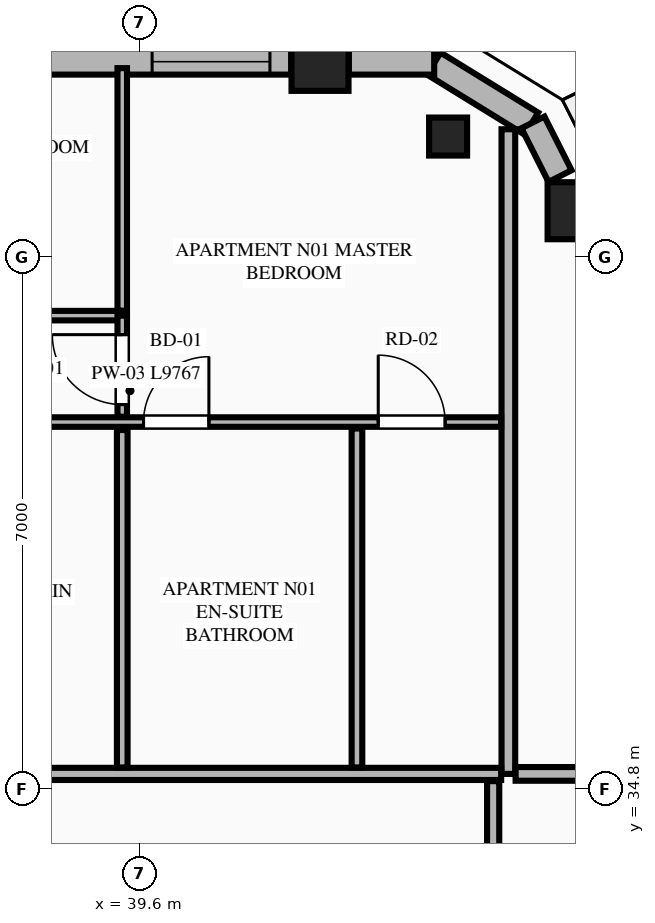
"""IFC4 building model, lengths in metres.
Left out: names, types, materials, properties, quantities, classifications, styles, units other than length and angle.
Written with IfcOpenShell. Run it as: python <this file> out.ifc"""

import sys

from ifc_helpers import new_model, si_unit, direction, frame, frame_2d, origin, origin_2d, place, context, subcontext, project, spatial, rectangle, extrude, element, fill, save


model = new_model("IFC4")
c1 = context("Model", 3, precision=1e-05, world=origin(), true_north=direction((0.0, 1.0)))
c2 = subcontext(c1, "Body", "Model", "MODEL_VIEW")
j1 = project(units=[si_unit("LENGTHUNIT", "METRE"), si_unit("PLANEANGLEUNIT", "RADIAN")], contexts=[c1])
p1 = place(None, origin())
s1 = spatial("IfcSite", under=j1, at=p1, CompositionType="ELEMENT")
p2 = place(p1, origin())
s2 = spatial("IfcBuilding", under=s1, at=p2, CompositionType="ELEMENT")
p3 = place(p2, frame((0.0, 0.0, 245.25)))
s3 = spatial("IfcBuildingStorey", under=s2, at=p3, CompositionType="ELEMENT", Elevation=245.25)
for number, where, z_axis, x_axis in (
    (1, (45.341, 42.409, 0.0), (0.0, 0.0, 1.0), (1.0, 0.0, 0.0)),
    (2, (41.972, 44.361, 0.0), (0.0, 0.0, 1.0), (1.0, 0.0, 0.0)),
):
    element("IfcColumn", number, at=place(p3, frame(where, z_axis=z_axis, x_axis=x_axis)), inside=s3, PredefinedType="COLUMN", context=c2, shape_type="SweptSolid", body=[
        extrude(rectangle(XDim=0.75, YDim=0.75, at=origin_2d()), origin(), (0.0, 0.0, 1.0), 3.65),
    ])
p4 = place(p3, frame((43.657, 43.385, 0.0), z_axis=(0.0, 0.0, 1.0), x_axis=(-0.865256437757, 0.501329529272, 0.0)))
e3 = element("IfcColumn", 3, at=p4, inside=s3, PredefinedType="PILASTER", context=c2, shape_type="SweptSolid", body=[
    extrude(rectangle(XDim=0.5, YDim=0.35, at=origin_2d()), origin(), (0.0, 0.0, 1.0), 3.65),
])
p5 = place(p3, frame((44.753, 43.555, 0.0), z_axis=(0.0, 0.0, 1.0), x_axis=(-0.851680557619, 0.52406128246, 0.0)))
e4 = element("IfcWall", 4, at=p5, inside=s3, PredefinedType="STANDARD", context=c2, shape_type="SweptSolid", body=[
    extrude(rectangle(XDim=1.508, YDim=0.34, at=frame_2d((0.754, 0.0))), origin(), (0.0, 0.0, 1.0), 3.45),
])
p6 = place(p3, frame((45.13, 42.865, 0.0), z_axis=(0.0, 0.0, 1.0), x_axis=(-0.451159191899, 0.892443490404, 0.0)))
e5 = element("IfcWall", 5, at=p6, inside=s3, PredefinedType="STANDARD", context=c2, shape_type="SweptSolid", body=[
    extrude(rectangle(XDim=0.791, YDim=0.34, at=frame_2d((0.396, 0.0))), origin(), (0.0, 0.0, 1.0), 3.45),
])
p7 = place(p3, frame((43.474, 44.37, 0.0), z_axis=(0.0, 0.0, 1.0), x_axis=(-1.0, 0.0, 0.0)))
e6 = element("IfcWall", 6, at=p7, inside=s3, PredefinedType="STANDARD", context=c2, shape_type="SweptSolid", body=[
    extrude(rectangle(XDim=1.123, YDim=0.34, at=frame_2d((0.562, 0.0))), origin(), (0.0, 0.0, 1.0), 3.45),
])
p8 = place(p3, frame((41.593, 44.37, 0.0), z_axis=(0.0, 0.0, 1.0), x_axis=(-1.0, 0.0, 0.0)))
e7 = element("IfcWall", 7, at=p8, inside=s3, PredefinedType="STANDARD", context=c2, shape_type="SweptSolid", body=[
    extrude(rectangle(XDim=5.56, YDim=0.34, at=frame_2d((2.78, 0.0))), origin(), (0.0, 0.0, 1.0), 2.983),
])
p9 = place(p8, frame((0.28, 0.0, 0.75)))
e8 = element("IfcOpeningElement", 8, at=p9, cuts=e7, PredefinedType="OPENING", context=c2, shape_type="SweptSolid", body=[
    extrude(rectangle(XDim=1.55, YDim=2.05, at=frame_2d((0.775, 1.025))), frame((0.0, 0.18, 0.0), z_axis=(0.0, -1.0, 0.0), x_axis=(1.0, 0.0, 0.0)), (0.0, 0.0, 1.0), 0.36),
])
p10 = place(p8, frame((3.398, 0.0, 0.75)))
e9 = element("IfcOpeningElement", 9, at=p10, cuts=e7, PredefinedType="OPENING", context=c2, shape_type="SweptSolid", body=[
    extrude(rectangle(XDim=1.1, YDim=2.0, at=frame_2d((0.55, 1.0))), frame((0.0, 0.18, 0.0), z_axis=(0.0, -1.0, 0.0), x_axis=(1.0, 0.0, 0.0)), (0.0, 0.0, 1.0), 0.36),
])
p11 = place(p3, frame((44.45, 35.0, 0.0), z_axis=(0.0, 0.0, 1.0), x_axis=(0.0, 1.0, 0.0)))
e10 = element("IfcWall", 10, at=p11, inside=s3, PredefinedType="PARTITIONING", context=c2, shape_type="SweptSolid", body=[
    extrude(rectangle(XDim=8.481, YDim=0.18, at=frame_2d((4.24, 0.0))), origin(), (0.0, 0.0, 1.0), 3.45),
])
p12 = place(p3, frame((20.445, 35.0, 0.0), z_axis=(0.0, 0.0, 1.0), x_axis=(1.0, 0.0, 0.0)))
e11 = element("IfcWall", 11, at=p12, inside=s3, PredefinedType="PARTITIONING", context=c2, shape_type="SweptSolid", body=[
    extrude(rectangle(XDim=23.91, YDim=0.16, at=frame_2d((11.955, 0.0))), origin(), (0.0, 0.0, 1.0), 3.45),
])
p13 = place(p12, frame((0.405, 0.0, 0.0)))
e12 = element("IfcOpeningElement", 12, at=p13, cuts=e11, PredefinedType="OPENING", context=c2, shape_type="SweptSolid", body=[
    extrude(rectangle(XDim=1.35, YDim=2.35, at=frame_2d((0.675, 1.175))), frame((0.0, 0.09, 0.0), z_axis=(0.0, -1.0, 0.0), x_axis=(1.0, 0.0, 0.0)), (0.0, 0.0, 1.0), 0.18),
])
p14 = place(p3, frame((34.588, 39.629, 0.0), z_axis=(0.0, 0.0, 1.0), x_axis=(1.0, 0.0, 0.0)))
e13 = element("IfcWall", 13, at=p14, inside=s3, PredefinedType="PARTITIONING", context=c2, shape_type="SweptSolid", body=[
    extrude(rectangle(XDim=9.767, YDim=0.125, at=frame_2d((4.884, 0.0))), origin(), (0.0, 0.0, 1.0), 3.45),
])
p15 = place(p14, frame((5.062, 0.0, 0.0)))
e14 = element("IfcOpeningElement", 14, at=p15, cuts=e13, PredefinedType="OPENING", context=c2, shape_type="SweptSolid", body=[
    extrude(rectangle(XDim=0.86, YDim=2.1, at=frame_2d((0.43, 1.05))), frame((0.0, 0.073, 0.0), z_axis=(0.0, -1.0, 0.0), x_axis=(1.0, 0.0, 0.0)), (0.0, 0.0, 1.0), 0.145),
])
p16 = place(p14, frame((8.15, 0.0, 0.0)))
e15 = element("IfcOpeningElement", 15, at=p16, cuts=e13, PredefinedType="OPENING", context=c2, shape_type="SweptSolid", body=[
    extrude(rectangle(XDim=0.88, YDim=2.15, at=frame_2d((0.44, 1.075))), frame((0.0, 0.073, 0.0), z_axis=(0.0, -1.0, 0.0), x_axis=(1.0, 0.0, 0.0)), (0.0, 0.0, 1.0), 0.145),
])
p17 = place(p14, frame((0.3, 0.0, 0.0)))
e16 = element("IfcOpeningElement", 16, at=p17, cuts=e13, PredefinedType="OPENING", context=c2, shape_type="SweptSolid", body=[
    extrude(rectangle(XDim=0.88, YDim=2.15, at=frame_2d((0.44, 1.075))), frame((0.0, 0.073, 0.0), z_axis=(0.0, -1.0, 0.0), x_axis=(1.0, 0.0, 0.0)), (0.0, 0.0, 1.0), 0.145),
])
p18 = place(p3, frame((29.508, 41.029, 0.0), z_axis=(0.0, 0.0, 1.0), x_axis=(1.0, 0.0, 0.0)))
e17 = element("IfcWall", 17, at=p18, inside=s3, PredefinedType="PARTITIONING", context=c2, shape_type="SweptSolid", body=[
    extrude(rectangle(XDim=9.862, YDim=0.125, at=frame_2d((4.931, 0.0))), origin(), (0.0, 0.0, 1.0), 3.45),
])
p19 = place(p18, frame((0.35, 0.0, 0.0)))
e18 = element("IfcOpeningElement", 18, at=p19, cuts=e17, PredefinedType="OPENING", context=c2, shape_type="SweptSolid", body=[
    extrude(rectangle(XDim=0.92, YDim=2.15, at=frame_2d((0.46, 1.075))), frame((0.0, 0.073, 0.0), z_axis=(0.0, -1.0, 0.0), x_axis=(1.0, 0.0, 0.0)), (0.0, 0.0, 1.0), 0.145),
])
p20 = place(p18, frame((5.43, 0.0, 0.0)))
e19 = element("IfcOpeningElement", 19, at=p20, cuts=e17, PredefinedType="OPENING", context=c2, shape_type="SweptSolid", body=[
    extrude(rectangle(XDim=0.92, YDim=2.15, at=frame_2d((0.46, 1.075))), frame((0.0, 0.073, 0.0), z_axis=(0.0, -1.0, 0.0), x_axis=(1.0, 0.0, 0.0)), (0.0, 0.0, 1.0), 0.145),
])
p21 = place(p3, frame((39.37, 39.699, 0.0), z_axis=(0.0, 0.0, 1.0), x_axis=(0.0, 1.0, 0.0)))
e20 = element("IfcWall", 20, at=p21, inside=s3, PredefinedType="PARTITIONING", context=c2, shape_type="SweptSolid", body=[
    extrude(rectangle(XDim=1.33, YDim=0.125, at=frame_2d((0.665, 0.0))), origin(), (0.0, 0.0, 1.0), 3.45),
])
p22 = place(p21, frame((0.16, 0.0, 0.0)))
e21 = element("IfcOpeningElement", 21, at=p22, cuts=e20, PredefinedType="OPENING", context=c2, shape_type="SweptSolid", body=[
    extrude(rectangle(XDim=0.92, YDim=2.15, at=frame_2d((0.46, 1.075))), frame((0.0, 0.073, 0.0), z_axis=(0.0, -1.0, 0.0), x_axis=(1.0, 0.0, 0.0)), (0.0, 0.0, 1.0), 0.145),
])
p23 = place(p3, frame((39.37, 41.094, 0.0), z_axis=(0.0, 0.0, 1.0), x_axis=(0.0, 1.0, 0.0)))
e22 = element("IfcWall", 22, at=p23, inside=s3, PredefinedType="PARTITIONING", context=c2, shape_type="SweptSolid", body=[
    extrude(rectangle(XDim=3.191, YDim=0.125, at=frame_2d((1.595, 0.0))), origin(), (0.0, 0.0, 1.0), 3.45),
])
p24 = place(p3, frame((39.37, 35.085, 0.0), z_axis=(0.0, 0.0, 1.0), x_axis=(0.0, 1.0, 0.0)))
e23 = element("IfcWall", 23, at=p24, inside=s3, PredefinedType="PLUMBINGWALL", context=c2, shape_type="SweptSolid", body=[
    extrude(rectangle(XDim=4.439, YDim=0.14, at=frame_2d((2.219, 0.0))), origin(), (0.0, 0.0, 1.0), 3.45),
])
p25 = place(p3, frame((42.458, 35.085, 0.0), z_axis=(0.0, 0.0, 1.0), x_axis=(0.0, 1.0, 0.0)))
e24 = element("IfcWall", 24, at=p25, inside=s3, PredefinedType="PLUMBINGWALL", context=c2, shape_type="SweptSolid", body=[
    extrude(rectangle(XDim=4.459, YDim=0.14, at=frame_2d((2.229, 0.0))), origin(), (0.0, 0.0, 1.0), 3.45),
])
p26 = place(p3, frame((44.545, 35.0, 0.0), z_axis=(0.0, 0.0, 1.0), x_axis=(1.0, 0.0, 0.0)))
e25 = element("IfcWall", 25, at=p26, inside=s3, PredefinedType="PARTITIONING", context=c2, shape_type="SweptSolid", body=[
    extrude(rectangle(XDim=4.322, YDim=0.18, at=frame_2d((2.161, 0.0))), origin(), (0.0, 0.0, 1.0), 3.45),
])
p27 = place(p3, frame((44.25, 16.495, 0.0), z_axis=(0.0, 0.0, 1.0), x_axis=(0.0, 1.0, 0.0)))
e26 = element("IfcWall", 26, at=p27, inside=s3, PredefinedType="PARTITIONING", context=c2, shape_type="SweptSolid", body=[
    extrude(rectangle(XDim=18.41, YDim=0.16, at=frame_2d((9.205, 0.0))), origin(), (0.0, 0.0, 1.0), 3.137),
])
p28 = place(p27, frame((0.45, 0.0, 0.0)))
e27 = element("IfcOpeningElement", 27, at=p28, cuts=e26, PredefinedType="OPENING", context=c2, shape_type="SweptSolid", body=[
    extrude(rectangle(XDim=1.02, YDim=2.25, at=frame_2d((0.51, 1.125))), frame((0.0, 0.09, 0.0), z_axis=(0.0, -1.0, 0.0), x_axis=(1.0, 0.0, 0.0)), (0.0, 0.0, 1.0), 0.18),
])
p29 = place(p9, origin())
e28 = element("IfcWindow", 28, at=p29, inside=s3, PartitioningType="SINGLE_PANEL", PredefinedType="WINDOW", context=c2, shape_type="SweptSolid", body=[
    extrude(rectangle(XDim=1.55, YDim=2.05, at=frame_2d((0.775, 1.025))), frame((0.0, 0.03, 0.0), z_axis=(0.0, -1.0, 0.0), x_axis=(1.0, 0.0, 0.0)), (0.0, 0.0, 1.0), 0.06),
])
fill(e8, e28)
p30 = place(p15, origin())
e29 = element("IfcDoor", 29, at=p30, inside=s3, OperationType="SINGLE_SWING_RIGHT", PredefinedType="DOOR", context=c2, shape_type="SweptSolid", body=[
    extrude(rectangle(XDim=0.86, YDim=2.1, at=frame_2d((0.43, 1.05))), frame((0.0, 0.025, 0.0), z_axis=(0.0, -1.0, 0.0), x_axis=(1.0, 0.0, 0.0)), (0.0, 0.0, 1.0), 0.05),
])
fill(e14, e29)
p31 = place(p16, origin())
e30 = element("IfcDoor", 30, at=p31, inside=s3, OperationType="SINGLE_SWING_LEFT", PredefinedType="DOOR", context=c2, shape_type="SweptSolid", body=[
    extrude(rectangle(XDim=0.88, YDim=2.15, at=frame_2d((0.44, 1.075))), frame((0.0, 0.025, 0.0), z_axis=(0.0, -1.0, 0.0), x_axis=(1.0, 0.0, 0.0)), (0.0, 0.0, 1.0), 0.05),
])
fill(e15, e30)
p32 = place(p22, origin())
e31 = element("IfcDoor", 31, at=p32, inside=s3, OperationType="SINGLE_SWING_RIGHT", PredefinedType="DOOR", context=c2, shape_type="SweptSolid", body=[
    extrude(rectangle(XDim=0.92, YDim=2.15, at=frame_2d((0.46, 1.075))), frame((0.0, 0.025, 0.0), z_axis=(0.0, -1.0, 0.0), x_axis=(1.0, 0.0, 0.0)), (0.0, 0.0, 1.0), 0.05),
])
fill(e21, e31)
save(model, sys.argv[1])
